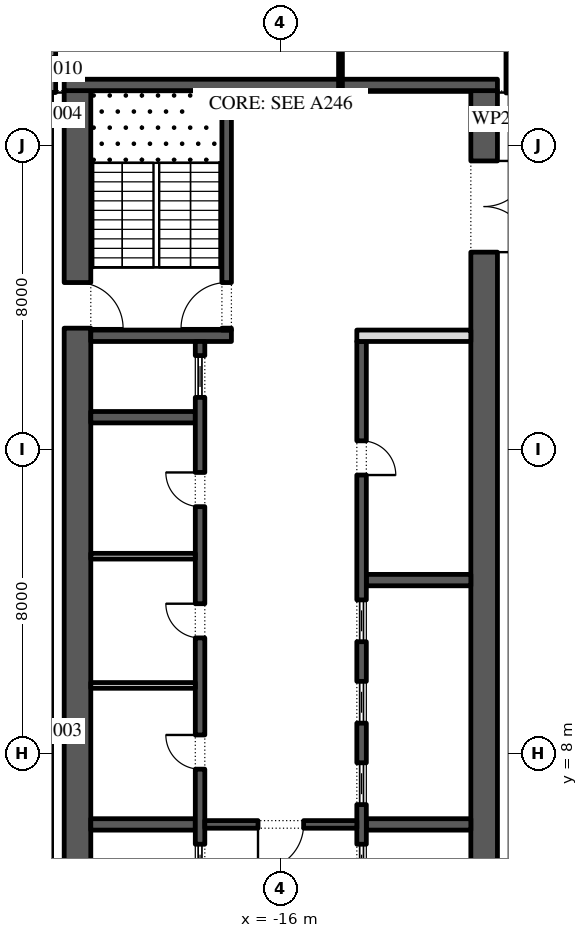
"""IFC4 building model, lengths in metres.
Left out: names, types, materials, properties, quantities, classifications, styles, units other than length and angle.
Written with IfcOpenShell. Run it as: python <this file> out.ifc"""

import sys

from ifc_helpers import new_model, si_unit, direction, frame, frame_2d, origin, place, context, subcontext, project, spatial, rectangle, extrude, element, fill, save


model = new_model("IFC4")
c1 = context("Model", 3, precision=1e-05, world=origin(), true_north=direction((0.0, 1.0)))
c2 = subcontext(c1, "Body", "Model", "MODEL_VIEW")
j1 = project(units=[si_unit("LENGTHUNIT", "METRE"), si_unit("PLANEANGLEUNIT", "RADIAN")], contexts=[c1])
p1 = place(None, origin())
s1 = spatial("IfcSite", under=j1, at=p1, CompositionType="ELEMENT")
p2 = place(p1, origin())
s2 = spatial("IfcBuilding", under=s1, at=p2, CompositionType="ELEMENT")
p3 = place(p2, frame((0.0, 0.0, 196.8)))
s3 = spatial("IfcBuildingStorey", under=s2, at=p3, CompositionType="ELEMENT", Elevation=196.8)
p4 = place(p3, frame((-33.157, 30.092, 0.0), z_axis=(0.0, 0.0, 1.0), x_axis=(0.224950279389, -0.974370243697, 0.0)))
e1 = element("IfcWall", 1, at=p4, inside=s3, PredefinedType="STANDARD", context=c2, shape_type="SweptSolid", body=[
    extrude(rectangle(XDim=49.5, YDim=0.3, at=frame_2d((24.75, 0.0))), origin(), (0.0, 0.0, 1.0), 4.0),
])
p5 = place(p4, frame((2.207, 0.0, 0.0)))
e2 = element("IfcOpeningElement", 2, at=p5, cuts=e1, PredefinedType="OPENING", context=c2, shape_type="SweptSolid", body=[
    extrude(rectangle(XDim=2.4, YDim=3.5, at=frame_2d((1.2, 1.75))), frame((0.0, 0.16, 0.0), z_axis=(0.0, -1.0, 0.0), x_axis=(1.0, 0.0, 0.0)), (0.0, 0.0, 1.0), 0.32),
])
p6 = place(p4, frame((8.121, 0.0, 0.45)))
e3 = element("IfcOpeningElement", 3, at=p6, cuts=e1, PredefinedType="OPENING", context=c2, shape_type="SweptSolid", body=[
    extrude(rectangle(XDim=4.5, YDim=2.825, at=frame_2d((2.25, 1.413))), frame((0.0, 0.16, 0.0), z_axis=(0.0, -1.0, 0.0), x_axis=(1.0, 0.0, 0.0)), (0.0, 0.0, 1.0), 0.32),
])
p7 = place(p4, frame((15.236, 0.0, 0.45)))
e4 = element("IfcOpeningElement", 4, at=p7, cuts=e1, PredefinedType="OPENING", context=c2, shape_type="SweptSolid", body=[
    extrude(rectangle(XDim=4.5, YDim=2.95, at=frame_2d((2.25, 1.475))), frame((0.0, 0.16, 0.0), z_axis=(0.0, -1.0, 0.0), x_axis=(1.0, 0.0, 0.0)), (0.0, 0.0, 1.0), 0.32),
])
p8 = place(p4, frame((22.35, 0.0, 0.45)))
e5 = element("IfcOpeningElement", 5, at=p8, cuts=e1, PredefinedType="OPENING", context=c2, shape_type="SweptSolid", body=[
    extrude(rectangle(XDim=4.5, YDim=3.0, at=frame_2d((2.25, 1.5))), frame((0.0, 0.16, 0.0), z_axis=(0.0, -1.0, 0.0), x_axis=(1.0, 0.0, 0.0)), (0.0, 0.0, 1.0), 0.32),
])
p9 = place(p4, frame((30.514, 0.0, 0.0)))
e6 = element("IfcOpeningElement", 6, at=p9, cuts=e1, PredefinedType="OPENING", context=c2, shape_type="SweptSolid", body=[
    extrude(rectangle(XDim=2.4, YDim=3.5, at=frame_2d((1.2, 1.75))), frame((0.0, 0.16, 0.0), z_axis=(0.0, -1.0, 0.0), x_axis=(1.0, 0.0, 0.0)), (0.0, 0.0, 1.0), 0.32),
])
p10 = place(p4, frame((36.579, 0.0, 0.45)))
e7 = element("IfcOpeningElement", 7, at=p10, cuts=e1, PredefinedType="OPENING", context=c2, shape_type="SweptSolid", body=[
    extrude(rectangle(XDim=4.5, YDim=3.05, at=frame_2d((2.25, 1.525))), frame((0.0, 0.16, 0.0), z_axis=(0.0, -1.0, 0.0), x_axis=(1.0, 0.0, 0.0)), (0.0, 0.0, 1.0), 0.32),
])
p11 = place(p4, frame((43.693, 0.0, 0.45)))
e8 = element("IfcOpeningElement", 8, at=p11, cuts=e1, PredefinedType="OPENING", context=c2, shape_type="SweptSolid", body=[
    extrude(rectangle(XDim=4.5, YDim=3.05, at=frame_2d((2.25, 1.525))), frame((0.0, 0.16, 0.0), z_axis=(0.0, -1.0, 0.0), x_axis=(1.0, 0.0, 0.0)), (0.0, 0.0, 1.0), 0.32),
])
p12 = place(p3, frame((-21.35, -2.45, 0.0), z_axis=(0.0, 0.0, 1.0), x_axis=(0.0, 1.0, 0.0)))
e9 = element("IfcWall", 9, at=p12, inside=s3, PredefinedType="SHEAR", context=c2, shape_type="SweptSolid", body=[
    extrude(rectangle(XDim=27.9, YDim=0.7, at=frame_2d((13.95, 0.0))), origin(), (0.0, 0.0, 1.0), 4.0),
])
p13 = place(p12, frame((5.05, 0.0, 0.0)))
e10 = element("IfcOpeningElement", 10, at=p13, cuts=e9, PredefinedType="OPENING", context=c2, shape_type="SweptSolid", body=[
    extrude(rectangle(XDim=1.2, YDim=2.1, at=frame_2d((0.6, 1.05))), frame((0.0, 0.36, 0.0), z_axis=(0.0, -1.0, 0.0), x_axis=(1.0, 0.0, 0.0)), (0.0, 0.0, 1.0), 0.72),
])
p14 = place(p12, frame((21.65, 0.0, 0.0)))
e11 = element("IfcOpeningElement", 11, at=p14, cuts=e9, PredefinedType="OPENING", context=c2, shape_type="SweptSolid", body=[
    extrude(rectangle(XDim=1.2, YDim=2.1, at=frame_2d((0.6, 1.05))), frame((0.0, 0.36, 0.0), z_axis=(0.0, -1.0, 0.0), x_axis=(1.0, 0.0, 0.0)), (0.0, 0.0, 1.0), 0.72),
])
p15 = place(p3, frame((-10.65, -2.45, 0.0), z_axis=(0.0, 0.0, 1.0), x_axis=(0.0, 1.0, 0.0)))
e12 = element("IfcWall", 12, at=p15, inside=s3, PredefinedType="SHEAR", context=c2, shape_type="SweptSolid", body=[
    extrude(rectangle(XDim=27.9, YDim=0.7, at=frame_2d((13.95, 0.0))), origin(), (0.0, 0.0, 1.0), 4.0),
])
p16 = place(p15, frame((23.65, 0.0, 0.0)))
e13 = element("IfcOpeningElement", 13, at=p16, cuts=e12, PredefinedType="OPENING", context=c2, shape_type="SweptSolid", body=[
    extrude(rectangle(XDim=2.4, YDim=2.1, at=frame_2d((1.2, 1.05))), frame((0.0, 0.36, 0.0), z_axis=(0.0, -1.0, 0.0), x_axis=(1.0, 0.0, 0.0)), (0.0, 0.0, 1.0), 0.72),
])
p17 = place(p15, frame((1.387, 0.0, 0.0)))
e14 = element("IfcOpeningElement", 14, at=p17, cuts=e12, PredefinedType="OPENING", context=c2, shape_type="SweptSolid", body=[
    extrude(rectangle(XDim=0.9, YDim=2.1, at=frame_2d((0.45, 1.05))), frame((0.0, 0.36, 0.0), z_axis=(0.0, -1.0, 0.0), x_axis=(1.0, 0.0, 0.0)), (0.0, 0.0, 1.0), 0.72),
])
p18 = place(p15, frame((4.562, 0.0, 0.0)))
e15 = element("IfcOpeningElement", 15, at=p18, cuts=e12, PredefinedType="OPENING", context=c2, shape_type="SweptSolid", body=[
    extrude(rectangle(XDim=1.0, YDim=2.1, at=frame_2d((0.5, 1.05))), frame((0.0, 0.36, 0.0), z_axis=(0.0, -1.0, 0.0), x_axis=(1.0, 0.0, 0.0)), (0.0, 0.0, 1.0), 0.72),
])
p19 = place(p3, frame((-21.7, 25.6, 0.0), z_axis=(0.0, 0.0, 1.0), x_axis=(1.0, 0.0, 0.0)))
e16 = element("IfcWall", 16, at=p19, inside=s3, PredefinedType="SHEAR", context=c2, shape_type="SweptSolid", body=[
    extrude(rectangle(XDim=11.4, YDim=0.3, at=frame_2d((5.7, 0.0))), origin(), (0.0, 0.0, 1.0), 4.0),
])
p20 = place(p3, frame((-21.0, 19.0, 0.0), z_axis=(0.0, 0.0, 1.0), x_axis=(1.0, 0.0, 0.0)))
e17 = element("IfcWall", 17, at=p20, inside=s3, PredefinedType="SHEAR", context=c2, shape_type="SweptSolid", body=[
    extrude(rectangle(XDim=3.7, YDim=0.3, at=frame_2d((1.85, 0.0))), origin(), (0.0, 0.0, 1.0), 4.0),
])
p21 = place(p3, frame((-17.425, 19.15, 0.0), z_axis=(0.0, 0.0, 1.0), x_axis=(0.0, 1.0, 0.0)))
e18 = element("IfcWall", 18, at=p21, inside=s3, PredefinedType="SHEAR", context=c2, shape_type="SweptSolid", body=[
    extrude(rectangle(XDim=6.3, YDim=0.25, at=frame_2d((3.15, 0.0))), origin(), (0.0, 0.0, 1.0), 4.0),
])
p22 = place(p21, frame((0.05, 0.0, 0.0)))
e19 = element("IfcOpeningElement", 19, at=p22, cuts=e18, PredefinedType="OPENING", context=c2, shape_type="SweptSolid", body=[
    extrude(rectangle(XDim=1.2, YDim=2.1, at=frame_2d((0.6, 1.05))), frame((0.0, 0.135, 0.0), z_axis=(0.0, -1.0, 0.0), x_axis=(1.0, 0.0, 0.0)), (0.0, 0.0, 1.0), 0.27),
])
for number, where, z_axis, x_axis in (
    (20, (-21.0, 6.143, 0.0), (0.0, 0.0, 1.0), (1.0, 0.0, 0.0)),
    (21, (-21.0, 16.857, 0.0), (0.0, 0.0, 1.0), (1.0, 0.0, 0.0)),
):
    element("IfcWall", number, at=place(p3, frame(where, z_axis=z_axis, x_axis=x_axis)), inside=s3, PredefinedType="SHEAR", context=c2, shape_type="SweptSolid", body=[
        extrude(rectangle(XDim=2.75, YDim=0.3, at=frame_2d((1.375, 0.0))), origin(), (0.0, 0.0, 1.0), 4.0),
    ])
p23 = place(p3, frame((-18.125, 4.15, 0.0), z_axis=(0.0, 0.0, 1.0), x_axis=(0.0, 1.0, 0.0)))
e22 = element("IfcWall", 22, at=p23, inside=s3, PredefinedType="SHEAR", context=c2, shape_type="SweptSolid", body=[
    extrude(rectangle(XDim=14.7, YDim=0.25, at=frame_2d((7.35, 0.0))), origin(), (0.0, 0.0, 1.0), 4.0),
])
p24 = place(p23, frame((3.446, 0.0, 0.0)))
e23 = element("IfcOpeningElement", 23, at=p24, cuts=e22, PredefinedType="OPENING", context=c2, shape_type="SweptSolid", body=[
    extrude(rectangle(XDim=0.9, YDim=2.1, at=frame_2d((0.45, 1.05))), frame((0.0, 0.135, 0.0), z_axis=(0.0, -1.0, 0.0), x_axis=(1.0, 0.0, 0.0)), (0.0, 0.0, 1.0), 0.27),
])
p25 = place(p23, frame((6.9, 0.0, 0.0)))
e24 = element("IfcOpeningElement", 24, at=p25, cuts=e22, PredefinedType="OPENING", context=c2, shape_type="SweptSolid", body=[
    extrude(rectangle(XDim=0.9, YDim=2.1, at=frame_2d((0.45, 1.05))), frame((0.0, 0.135, 0.0), z_axis=(0.0, -1.0, 0.0), x_axis=(1.0, 0.0, 0.0)), (0.0, 0.0, 1.0), 0.27),
])
p26 = place(p23, frame((10.354, 0.0, 0.0)))
e25 = element("IfcOpeningElement", 25, at=p26, cuts=e22, PredefinedType="OPENING", context=c2, shape_type="SweptSolid", body=[
    extrude(rectangle(XDim=0.9, YDim=2.1, at=frame_2d((0.45, 1.05))), frame((0.0, 0.135, 0.0), z_axis=(0.0, -1.0, 0.0), x_axis=(1.0, 0.0, 0.0)), (0.0, 0.0, 1.0), 0.27),
])
p27 = place(p23, frame((0.371, 0.0, 0.0)))
e26 = element("IfcOpeningElement", 26, at=p27, cuts=e22, PredefinedType="OPENING", context=c2, shape_type="SweptSolid", body=[
    extrude(rectangle(XDim=1.1, YDim=2.1, at=frame_2d((0.55, 1.05))), frame((0.0, 0.135, 0.0), z_axis=(0.0, -1.0, 0.0), x_axis=(1.0, 0.0, 0.0)), (0.0, 0.0, 1.0), 0.27),
])
p28 = place(p23, frame((13.229, 0.0, 0.0)))
e27 = element("IfcOpeningElement", 27, at=p28, cuts=e22, PredefinedType="OPENING", context=c2, shape_type="SweptSolid", body=[
    extrude(rectangle(XDim=1.1, YDim=2.1, at=frame_2d((0.55, 1.05))), frame((0.0, 0.135, 0.0), z_axis=(0.0, -1.0, 0.0), x_axis=(1.0, 0.0, 0.0)), (0.0, 0.0, 1.0), 0.27),
])
for number, where, z_axis, x_axis in (
    (28, (-21.0, 9.8, 0.0), (0.0, 0.0, 1.0), (1.0, 0.0, 0.0)),
    (29, (-21.0, 13.2, 0.0), (0.0, 0.0, 1.0), (1.0, 0.0, 0.0)),
):
    element("IfcWall", number, at=place(p3, frame(where, z_axis=z_axis, x_axis=x_axis)), inside=s3, PredefinedType="PARTITIONING", context=c2, shape_type="SweptSolid", body=[
        extrude(rectangle(XDim=2.75, YDim=0.15, at=frame_2d((1.375, 0.0))), origin(), (0.0, 0.0, 1.0), 4.0),
    ])
for number, where, z_axis, x_axis in (
    (30, (-13.75, 6.143, 0.0), (0.0, 0.0, 1.0), (1.0, 0.0, 0.0)),
    (31, (-13.75, 12.571, 0.0), (0.0, 0.0, 1.0), (1.0, 0.0, 0.0)),
):
    element("IfcWall", number, at=place(p3, frame(where, z_axis=z_axis, x_axis=x_axis)), inside=s3, PredefinedType="SHEAR", context=c2, shape_type="SweptSolid", body=[
        extrude(rectangle(XDim=2.75, YDim=0.3, at=frame_2d((1.375, 0.0))), origin(), (0.0, 0.0, 1.0), 4.0),
    ])
p29 = place(p3, frame((-13.875, -2.45, 0.0), z_axis=(0.0, 0.0, 1.0), x_axis=(0.0, 1.0, 0.0)))
e32 = element("IfcWall", 32, at=p29, inside=s3, PredefinedType="SHEAR", context=c2, shape_type="SweptSolid", body=[
    extrude(rectangle(XDim=21.3, YDim=0.25, at=frame_2d((10.65, 0.0))), origin(), (0.0, 0.0, 1.0), 4.0),
])
p30 = place(p29, frame((17.786, 0.0, 0.0)))
e33 = element("IfcOpeningElement", 33, at=p30, cuts=e32, PredefinedType="OPENING", context=c2, shape_type="SweptSolid", body=[
    extrude(rectangle(XDim=0.9, YDim=2.1, at=frame_2d((0.45, 1.05))), frame((0.0, 0.135, 0.0), z_axis=(0.0, -1.0, 0.0), x_axis=(1.0, 0.0, 0.0)), (0.0, 0.0, 1.0), 0.27),
])
p31 = place(p29, frame((6.971, 0.0, 0.0)))
e34 = element("IfcOpeningElement", 34, at=p31, cuts=e32, PredefinedType="OPENING", context=c2, shape_type="SweptSolid", body=[
    extrude(rectangle(XDim=1.1, YDim=2.1, at=frame_2d((0.55, 1.05))), frame((0.0, 0.135, 0.0), z_axis=(0.0, -1.0, 0.0), x_axis=(1.0, 0.0, 0.0)), (0.0, 0.0, 1.0), 0.27),
])
p32 = place(p29, frame((9.114, 0.0, 0.0)))
e35 = element("IfcOpeningElement", 35, at=p32, cuts=e32, PredefinedType="OPENING", context=c2, shape_type="SweptSolid", body=[
    extrude(rectangle(XDim=1.1, YDim=2.1, at=frame_2d((0.55, 1.05))), frame((0.0, 0.135, 0.0), z_axis=(0.0, -1.0, 0.0), x_axis=(1.0, 0.0, 0.0)), (0.0, 0.0, 1.0), 0.27),
])
p33 = place(p29, frame((11.257, 0.0, 0.0)))
e36 = element("IfcOpeningElement", 36, at=p33, cuts=e32, PredefinedType="OPENING", context=c2, shape_type="SweptSolid", body=[
    extrude(rectangle(XDim=1.1, YDim=2.1, at=frame_2d((0.55, 1.05))), frame((0.0, 0.135, 0.0), z_axis=(0.0, -1.0, 0.0), x_axis=(1.0, 0.0, 0.0)), (0.0, 0.0, 1.0), 0.27),
])
p34 = place(p29, frame((13.4, 0.0, 0.0)))
e37 = element("IfcOpeningElement", 37, at=p34, cuts=e32, PredefinedType="OPENING", context=c2, shape_type="SweptSolid", body=[
    extrude(rectangle(XDim=1.1, YDim=2.1, at=frame_2d((0.55, 1.05))), frame((0.0, 0.135, 0.0), z_axis=(0.0, -1.0, 0.0), x_axis=(1.0, 0.0, 0.0)), (0.0, 0.0, 1.0), 0.27),
])
p35 = place(p3, frame((-14.0, 19.0, 0.0), z_axis=(0.0, 0.0, 1.0), x_axis=(1.0, 0.0, 0.0)))
e38 = element("IfcWall", 38, at=p35, inside=s3, PredefinedType="PARTITIONING", context=c2, shape_type="SweptSolid", body=[
    extrude(rectangle(XDim=3.0, YDim=0.3, at=frame_2d((1.5, 0.0))), origin(), (0.0, 0.0, 1.0), 4.0),
])
p36 = place(p3, frame((-18.0, 6.143, 0.0), z_axis=(0.0, 0.0, 1.0), x_axis=(1.0, 0.0, 0.0)))
e39 = element("IfcWall", 39, at=p36, inside=s3, PredefinedType="SHEAR", context=c2, shape_type="SweptSolid", body=[
    extrude(rectangle(XDim=4.0, YDim=0.2, at=frame_2d((2.0, 0.0))), origin(), (0.0, 0.0, 1.0), 4.0),
])
p37 = place(p36, frame((1.4, 0.0, 0.0)))
e40 = element("IfcOpeningElement", 40, at=p37, cuts=e39, PredefinedType="OPENING", context=c2, shape_type="SweptSolid", body=[
    extrude(rectangle(XDim=1.2, YDim=2.1, at=frame_2d((0.6, 1.05))), frame((0.0, 0.11, 0.0), z_axis=(0.0, -1.0, 0.0), x_axis=(1.0, 0.0, 0.0)), (0.0, 0.0, 1.0), 0.22),
])
p38 = place(p3, frame((-22.0, 27.125, 0.0), z_axis=(0.0, 0.0, 1.0), x_axis=(0.0, -1.0, 0.0)))
e41 = element("IfcWall", 41, at=p38, inside=s3, PredefinedType="PARTITIONING", context=c2, shape_type="SweptSolid", body=[
    extrude(rectangle(XDim=1.725, YDim=0.15, at=frame_2d((0.863, 0.0))), origin(), (0.0, 0.0, 1.0), 4.0),
])
p39 = place(p3, frame((-14.43, 38.193, 0.0), z_axis=(0.0, 0.0, 1.0), x_axis=(0.0, -1.0, 0.0)))
e42 = element("IfcWall", 42, at=p39, inside=s3, PredefinedType="PARTITIONING", context=c2, shape_type="SweptSolid", body=[
    extrude(rectangle(XDim=12.793, YDim=0.1, at=frame_2d((6.396, 0.0))), origin(), (0.0, 0.0, 1.0), 4.0),
])
p40 = place(p39, frame((4.473, 0.0, 0.0)))
e43 = element("IfcOpeningElement", 43, at=p40, cuts=e42, PredefinedType="OPENING", context=c2, shape_type="SweptSolid", body=[
    extrude(rectangle(XDim=0.9, YDim=2.1, at=frame_2d((0.45, 1.05))), frame((0.0, 0.06, 0.0), z_axis=(0.0, -1.0, 0.0), x_axis=(1.0, 0.0, 0.0)), (0.0, 0.0, 1.0), 0.12),
])
p41 = place(p3, frame((-10.0, 25.39, 0.0), z_axis=(0.0, 0.0, 1.0), x_axis=(0.0, 1.0, 0.0)))
e44 = element("IfcWall", 44, at=p41, inside=s3, PredefinedType="PARTITIONING", context=c2, shape_type="SweptSolid", body=[
    extrude(rectangle(XDim=1.81, YDim=0.15, at=frame_2d((0.905, 0.0))), origin(), (0.0, 0.0, 1.0), 4.0),
])
p42 = place(p24, origin())
e45 = element("IfcDoor", 45, at=p42, inside=s3, OperationType="SINGLE_SWING_LEFT", PredefinedType="DOOR", context=c2, shape_type="SweptSolid", body=[
    extrude(rectangle(XDim=0.9, YDim=2.1, at=frame_2d((0.45, 1.05))), frame((0.0, 0.125, 0.0), z_axis=(0.0, -1.0, 0.0), x_axis=(1.0, 0.0, 0.0)), (0.0, 0.0, 1.0), 0.05),
])
fill(e23, e45)
p43 = place(p25, origin())
e46 = element("IfcDoor", 46, at=p43, inside=s3, OperationType="SINGLE_SWING_LEFT", PredefinedType="DOOR", context=c2, shape_type="SweptSolid", body=[
    extrude(rectangle(XDim=0.9, YDim=2.1, at=frame_2d((0.45, 1.05))), frame((0.0, 0.125, 0.0), z_axis=(0.0, -1.0, 0.0), x_axis=(1.0, 0.0, 0.0)), (0.0, 0.0, 1.0), 0.05),
])
fill(e24, e46)
p44 = place(p26, origin())
e47 = element("IfcDoor", 47, at=p44, inside=s3, OperationType="SINGLE_SWING_LEFT", PredefinedType="DOOR", context=c2, shape_type="SweptSolid", body=[
    extrude(rectangle(XDim=0.9, YDim=2.1, at=frame_2d((0.45, 1.05))), frame((0.0, 0.125, 0.0), z_axis=(0.0, -1.0, 0.0), x_axis=(1.0, 0.0, 0.0)), (0.0, 0.0, 1.0), 0.05),
])
fill(e25, e47)
p45 = place(p27, origin())
e48 = element("IfcDoor", 48, at=p45, inside=s3, OperationType="SLIDING_TO_LEFT", PredefinedType="DOOR", context=c2, shape_type="SweptSolid", body=[
    extrude(rectangle(XDim=1.1, YDim=2.1, at=frame_2d((0.55, 1.05))), frame((0.0, 0.025, 0.0), z_axis=(0.0, -1.0, 0.0), x_axis=(1.0, 0.0, 0.0)), (0.0, 0.0, 1.0), 0.05),
])
fill(e26, e48)
p46 = place(p28, origin())
e49 = element("IfcDoor", 49, at=p46, inside=s3, OperationType="SLIDING_TO_LEFT", PredefinedType="DOOR", context=c2, shape_type="SweptSolid", body=[
    extrude(rectangle(XDim=1.1, YDim=2.1, at=frame_2d((0.55, 1.05))), frame((0.0, 0.025, 0.0), z_axis=(0.0, -1.0, 0.0), x_axis=(1.0, 0.0, 0.0)), (0.0, 0.0, 1.0), 0.05),
])
fill(e27, e49)
p47 = place(p30, frame((0.9, -0.2, 0.0), z_axis=(0.0, 0.0, 1.0), x_axis=(-1.0, 0.0, 0.0)))
e50 = element("IfcDoor", 50, at=p47, inside=s3, OperationType="SINGLE_SWING_LEFT", PredefinedType="DOOR", context=c2, shape_type="SweptSolid", body=[
    extrude(rectangle(XDim=0.9, YDim=2.1, at=frame_2d((0.45, 1.05))), frame((0.0, -0.075, 0.0), z_axis=(0.0, -1.0, 0.0), x_axis=(1.0, 0.0, 0.0)), (0.0, 0.0, 1.0), 0.05),
])
fill(e33, e50)
p48 = place(p31, origin())
e51 = element("IfcDoor", 51, at=p48, inside=s3, OperationType="SLIDING_TO_LEFT", PredefinedType="DOOR", context=c2, shape_type="SweptSolid", body=[
    extrude(rectangle(XDim=1.1, YDim=2.1, at=frame_2d((0.55, 1.05))), frame((0.0, 0.025, 0.0), z_axis=(0.0, -1.0, 0.0), x_axis=(1.0, 0.0, 0.0)), (0.0, 0.0, 1.0), 0.05),
])
fill(e34, e51)
p49 = place(p32, origin())
e52 = element("IfcDoor", 52, at=p49, inside=s3, OperationType="SLIDING_TO_LEFT", PredefinedType="DOOR", context=c2, shape_type="SweptSolid", body=[
    extrude(rectangle(XDim=1.1, YDim=2.1, at=frame_2d((0.55, 1.05))), frame((0.0, 0.025, 0.0), z_axis=(0.0, -1.0, 0.0), x_axis=(1.0, 0.0, 0.0)), (0.0, 0.0, 1.0), 0.05),
])
fill(e35, e52)
p50 = place(p33, origin())
e53 = element("IfcDoor", 53, at=p50, inside=s3, OperationType="SLIDING_TO_LEFT", PredefinedType="DOOR", context=c2, shape_type="SweptSolid", body=[
    extrude(rectangle(XDim=1.1, YDim=2.1, at=frame_2d((0.55, 1.05))), frame((0.0, 0.025, 0.0), z_axis=(0.0, -1.0, 0.0), x_axis=(1.0, 0.0, 0.0)), (0.0, 0.0, 1.0), 0.05),
])
fill(e36, e53)
p51 = place(p34, origin())
e54 = element("IfcDoor", 54, at=p51, inside=s3, OperationType="SLIDING_TO_LEFT", PredefinedType="DOOR", context=c2, shape_type="SweptSolid", body=[
    extrude(rectangle(XDim=1.1, YDim=2.1, at=frame_2d((0.55, 1.05))), frame((0.0, 0.025, 0.0), z_axis=(0.0, -1.0, 0.0), x_axis=(1.0, 0.0, 0.0)), (0.0, 0.0, 1.0), 0.05),
])
fill(e37, e54)
p52 = place(p37, frame((1.2, 0.0, 0.0), z_axis=(0.0, 0.0, 1.0), x_axis=(-1.0, 0.0, 0.0)))
e55 = element("IfcDoor", 55, at=p52, inside=s3, OperationType="SINGLE_SWING_LEFT", PredefinedType="DOOR", context=c2, shape_type="SweptSolid", body=[
    extrude(rectangle(XDim=1.2, YDim=2.1, at=frame_2d((0.6, 1.05))), frame((0.0, 0.025, 0.0), z_axis=(0.0, -1.0, 0.0), x_axis=(1.0, 0.0, 0.0)), (0.0, 0.0, 1.0), 0.05),
])
fill(e40, e55)
p53 = place(p16, frame((2.4, 0.0, 0.0), z_axis=(0.0, 0.0, 1.0), x_axis=(-1.0, 0.0, 0.0)))
e56 = element("IfcDoor", 56, at=p53, inside=s3, OperationType="DOUBLE_DOOR_SINGLE_SWING", PredefinedType="DOOR", context=c2, shape_type="SweptSolid", body=[
    extrude(rectangle(XDim=2.4, YDim=2.1, at=frame_2d((1.2, 1.05))), frame((0.0, 0.025, 0.0), z_axis=(0.0, -1.0, 0.0), x_axis=(1.0, 0.0, 0.0)), (0.0, 0.0, 1.0), 0.05),
])
fill(e13, e56)
p54 = place(p22, origin())
e57 = element("IfcDoor", 57, at=p54, inside=s3, OperationType="SINGLE_SWING_RIGHT", PredefinedType="DOOR", context=c2, shape_type="SweptSolid", body=[
    extrude(rectangle(XDim=1.2, YDim=2.1, at=frame_2d((0.6, 1.05))), frame((0.0, 0.025, 0.0), z_axis=(0.0, -1.0, 0.0), x_axis=(1.0, 0.0, 0.0)), (0.0, 0.0, 1.0), 0.05),
])
fill(e19, e57)
p55 = place(p14, frame((1.2, 0.0, 0.0), z_axis=(0.0, 0.0, 1.0), x_axis=(-1.0, 0.0, 0.0)))
e58 = element("IfcDoor", 58, at=p55, inside=s3, OperationType="SINGLE_SWING_LEFT", PredefinedType="DOOR", context=c2, shape_type="SweptSolid", body=[
    extrude(rectangle(XDim=1.2, YDim=2.1, at=frame_2d((0.6, 1.05))), frame((0.0, 0.025, 0.0), z_axis=(0.0, -1.0, 0.0), x_axis=(1.0, 0.0, 0.0)), (0.0, 0.0, 1.0), 0.05),
])
fill(e11, e58)
save(model, sys.argv[1])
